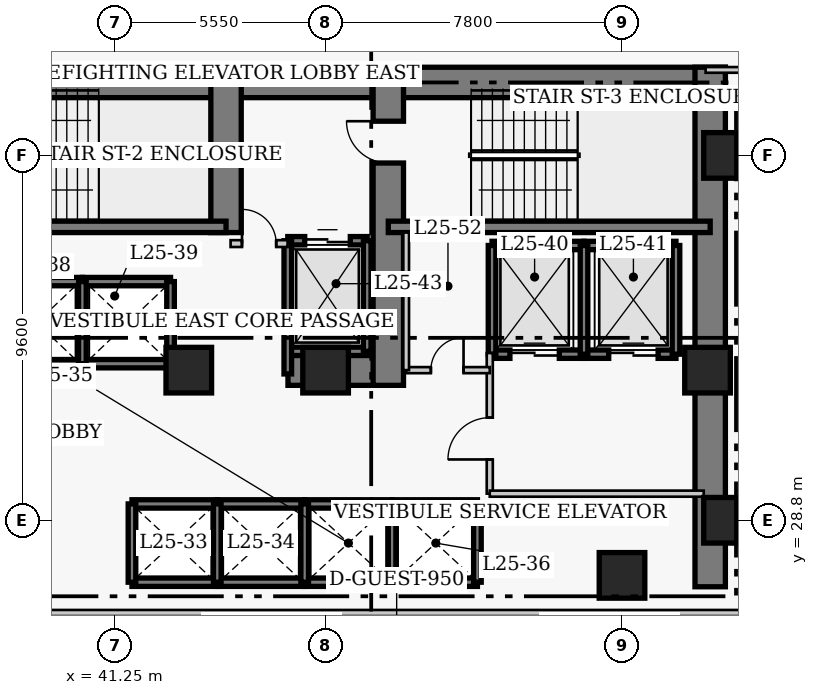
"""IFC4 building model, lengths in metres.
Left out: names, types, materials, properties, quantities, classifications, styles, units other than length and angle.
Written with IfcOpenShell. Run it as: python <this file> out.ifc"""

import sys

from ifc_helpers import new_model, si_unit, direction, frame, frame_2d, origin, origin_2d, place, context, subcontext, project, spatial, rectangle, extrude, element, fill, save


model = new_model("IFC4")
c1 = context("Model", 3, precision=1e-05, world=origin(), true_north=direction((0.0, 1.0)))
c2 = subcontext(c1, "Body", "Model", "MODEL_VIEW")
j1 = project(units=[si_unit("LENGTHUNIT", "METRE"), si_unit("PLANEANGLEUNIT", "RADIAN")], contexts=[c1])
p1 = place(None, origin())
s1 = spatial("IfcSite", under=j1, at=p1, CompositionType="ELEMENT")
p2 = place(p1, origin())
s2 = spatial("IfcBuilding", under=s1, at=p2, CompositionType="ELEMENT")
p3 = place(p2, frame((0.0, 0.0, 103.2)))
s3 = spatial("IfcBuildingStorey", under=s2, at=p3, CompositionType="ELEMENT", Elevation=103.2)
p4 = place(p3, frame((35.85, 40.32, 0.0), z_axis=(0.0, 0.0, 1.0), x_axis=(1.0, 0.0, 0.0)))
e1 = element("IfcWall", 1, at=p4, inside=s3, PredefinedType="SHEAR", context=c2, shape_type="SweptSolid", body=[
    extrude(rectangle(XDim=12.6, YDim=0.8, at=frame_2d((6.3, 0.0))), origin(), (0.0, 0.0, 1.0), 3.8),
])
p5 = place(p3, frame((48.45, 40.32, 0.0), z_axis=(0.0, 0.0, 1.0), x_axis=(1.0, 0.0, 0.0)))
e2 = element("IfcWall", 2, at=p5, inside=s3, PredefinedType="SHEAR", context=c2, shape_type="SweptSolid", body=[
    extrude(rectangle(XDim=8.87, YDim=0.8, at=frame_2d((4.435, 0.0))), origin(), (0.0, 0.0, 1.0), 3.8),
])
p6 = place(p3, frame((56.92, 27.05, 0.0), z_axis=(0.0, 0.0, 1.0), x_axis=(0.0, 1.0, 0.0)))
e3 = element("IfcWall", 3, at=p6, inside=s3, PredefinedType="SHEAR", context=c2, shape_type="SweptSolid", body=[
    extrude(rectangle(XDim=13.67, YDim=0.8, at=frame_2d((6.835, 0.0))), origin(), (0.0, 0.0, 1.0), 3.8),
])
p7 = place(p3, frame((45.81, 32.75, 0.0), z_axis=(0.0, 0.0, 1.0), x_axis=(1.0, 0.0, 0.0)))
e4 = element("IfcWall", 4, at=p7, inside=s3, PredefinedType="SHEAR", context=c2, shape_type="SweptSolid", body=[
    extrude(rectangle(XDim=2.64, YDim=0.8, at=frame_2d((1.32, 0.0))), origin(), (0.0, 0.0, 1.0), 3.8),
])
p8 = place(p3, frame((44.18, 36.37, 0.0), z_axis=(0.0, 0.0, 1.0), x_axis=(0.0, 1.0, 0.0)))
e5 = element("IfcWall", 5, at=p8, inside=s3, PredefinedType="SHEAR", context=c2, shape_type="SweptSolid", body=[
    extrude(rectangle(XDim=3.95, YDim=0.8, at=frame_2d((1.975, 0.0))), origin(), (0.0, 0.0, 1.0), 3.8),
])
p9 = place(p3, frame((48.45, 32.35, 0.0), z_axis=(0.0, 0.0, 1.0), x_axis=(0.0, 1.0, 0.0)))
e6 = element("IfcWall", 6, at=p9, inside=s3, PredefinedType="SHEAR", context=c2, shape_type="SweptSolid", body=[
    extrude(rectangle(XDim=7.97, YDim=0.8, at=frame_2d((3.985, 0.0))), origin(), (0.0, 0.0, 1.0), 3.8),
])
p10 = place(p9, frame((5.85, 0.0, 0.0)))
e7 = element("IfcOpeningElement", 7, at=p10, cuts=e6, PredefinedType="OPENING", context=c2, shape_type="SweptSolid", body=[
    extrude(rectangle(XDim=1.1, YDim=2.15, at=frame_2d((0.55, 1.075))), frame((0.0, 0.41, 0.0), z_axis=(0.0, -1.0, 0.0), x_axis=(1.0, 0.0, 0.0)), (0.0, 0.0, 1.0), 0.82),
])
p11 = place(p3, frame((35.85, 36.52, 0.0), z_axis=(0.0, 0.0, 1.0), x_axis=(1.0, 0.0, 0.0)))
e8 = element("IfcWall", 8, at=p11, inside=s3, PredefinedType="SHEAR", context=c2, shape_type="SweptSolid", body=[
    extrude(rectangle(XDim=8.33, YDim=0.3, at=frame_2d((4.165, 0.0))), origin(), (0.0, 0.0, 1.0), 3.8),
])
p12 = place(p3, frame((48.45, 36.52, 0.0), z_axis=(0.0, 0.0, 1.0), x_axis=(1.0, 0.0, 0.0)))
e9 = element("IfcWall", 9, at=p12, inside=s3, PredefinedType="SHEAR", context=c2, shape_type="SweptSolid", body=[
    extrude(rectangle(XDim=8.47, YDim=0.3, at=frame_2d((4.235, 0.0))), origin(), (0.0, 0.0, 1.0), 3.8),
])
for number, where, z_axis, x_axis in (
    (10, (57.35, 28.8, 0.0), (0.0, 0.0, 1.0), (1.0, 0.0, 0.0)),
    (11, (57.35, 38.4, 0.0), (0.0, 0.0, 1.0), (1.0, 0.0, 0.0)),
    (12, (43.2, 32.75, 0.0), (0.0, 0.0, 1.0), (1.0, 0.0, 0.0)),
    (13, (46.8, 32.75, 0.0), (0.0, 0.0, 1.0), (1.0, 0.0, 0.0)),
    (14, (54.6, 27.35, 0.0), (0.0, 0.0, 1.0), (1.0, 0.0, 0.0)),
    (15, (56.85, 32.75, 0.0), (0.0, 0.0, 1.0), (1.0, 0.0, 0.0)),
):
    element("IfcColumn", number, at=place(p3, frame(where, z_axis=z_axis, x_axis=x_axis)), inside=s3, PredefinedType="COLUMN", context=c2, shape_type="SweptSolid", body=[
        extrude(rectangle(XDim=1.2, YDim=1.2, at=origin_2d()), origin(), (0.0, 0.0, 1.0), 3.8),
    ])
for number, where, z_axis, x_axis in (
    (16, (41.705, 29.23, 0.0), (0.0, 0.0, 1.0), (1.0, 0.0, 0.0)),
    (17, (41.705, 27.17, 0.0), (0.0, 0.0, 1.0), (1.0, 0.0, 0.0)),
):
    element("IfcWall", number, at=place(p3, frame(where, z_axis=z_axis, x_axis=x_axis)), inside=s3, PredefinedType="SHEAR", context=c2, shape_type="SweptSolid", body=[
        extrude(rectangle(XDim=2.245, YDim=0.22, at=frame_2d((1.123, 0.0))), origin(), (0.0, 0.0, 1.0), 3.8),
    ])
p13 = place(p3, frame((41.705, 27.17, 0.0), z_axis=(0.0, 0.0, 1.0), x_axis=(0.0, 1.0, 0.0)))
e18 = element("IfcWall", 18, at=p13, inside=s3, PredefinedType="SHEAR", context=c2, shape_type="SweptSolid", body=[
    extrude(rectangle(XDim=2.06, YDim=0.2, at=frame_2d((1.03, 0.0))), origin(), (0.0, 0.0, 1.0), 3.8),
])
for number, where, z_axis, x_axis in (
    (19, (43.95, 29.23, 0.0), (0.0, 0.0, 1.0), (1.0, 0.0, 0.0)),
    (20, (43.95, 27.17, 0.0), (0.0, 0.0, 1.0), (1.0, 0.0, 0.0)),
):
    element("IfcWall", number, at=place(p3, frame(where, z_axis=z_axis, x_axis=x_axis)), inside=s3, PredefinedType="SHEAR", context=c2, shape_type="SweptSolid", body=[
        extrude(rectangle(XDim=2.3, YDim=0.22, at=frame_2d((1.15, 0.0))), origin(), (0.0, 0.0, 1.0), 3.8),
    ])
p14 = place(p3, frame((43.95, 27.17, 0.0), z_axis=(0.0, 0.0, 1.0), x_axis=(0.0, 1.0, 0.0)))
e21 = element("IfcWall", 21, at=p14, inside=s3, PredefinedType="SHEAR", context=c2, shape_type="SweptSolid", body=[
    extrude(rectangle(XDim=2.06, YDim=0.2, at=frame_2d((1.03, 0.0))), origin(), (0.0, 0.0, 1.0), 3.8),
])
for number, where, z_axis, x_axis in (
    (22, (46.25, 29.23, 0.0), (0.0, 0.0, 1.0), (1.0, 0.0, 0.0)),
    (23, (46.25, 27.17, 0.0), (0.0, 0.0, 1.0), (1.0, 0.0, 0.0)),
):
    element("IfcWall", number, at=place(p3, frame(where, z_axis=z_axis, x_axis=x_axis)), inside=s3, PredefinedType="SHEAR", context=c2, shape_type="SweptSolid", body=[
        extrude(rectangle(XDim=2.3, YDim=0.22, at=frame_2d((1.15, 0.0))), origin(), (0.0, 0.0, 1.0), 3.8),
    ])
p15 = place(p3, frame((46.25, 27.17, 0.0), z_axis=(0.0, 0.0, 1.0), x_axis=(0.0, 1.0, 0.0)))
e24 = element("IfcWall", 24, at=p15, inside=s3, PredefinedType="SHEAR", context=c2, shape_type="SweptSolid", body=[
    extrude(rectangle(XDim=2.06, YDim=0.2, at=frame_2d((1.03, 0.0))), origin(), (0.0, 0.0, 1.0), 3.8),
])
for number, where, z_axis, x_axis in (
    (25, (48.55, 29.23, 0.0), (0.0, 0.0, 1.0), (1.0, 0.0, 0.0)),
    (26, (48.55, 27.17, 0.0), (0.0, 0.0, 1.0), (1.0, 0.0, 0.0)),
):
    element("IfcWall", number, at=place(p3, frame(where, z_axis=z_axis, x_axis=x_axis)), inside=s3, PredefinedType="SHEAR", context=c2, shape_type="SweptSolid", body=[
        extrude(rectangle(XDim=2.245, YDim=0.22, at=frame_2d((1.123, 0.0))), origin(), (0.0, 0.0, 1.0), 3.8),
    ])
for number, where, z_axis, x_axis in (
    (27, (48.55, 27.17, 0.0), (0.0, 0.0, 1.0), (0.0, 1.0, 0.0)),
    (28, (50.795, 27.17, 0.0), (0.0, 0.0, 1.0), (0.0, 1.0, 0.0)),
):
    element("IfcWall", number, at=place(p3, frame(where, z_axis=z_axis, x_axis=x_axis)), inside=s3, PredefinedType="SHEAR", context=c2, shape_type="SweptSolid", body=[
        extrude(rectangle(XDim=2.06, YDim=0.2, at=frame_2d((1.03, 0.0))), origin(), (0.0, 0.0, 1.0), 3.8),
    ])
for number, where, z_axis, x_axis in (
    (29, (38.0, 35.08, 0.0), (0.0, 0.0, 1.0), (1.0, 0.0, 0.0)),
    (30, (38.0, 32.92, 0.0), (0.0, 0.0, 1.0), (1.0, 0.0, 0.0)),
):
    element("IfcWall", number, at=place(p3, frame(where, z_axis=z_axis, x_axis=x_axis)), inside=s3, PredefinedType="SHEAR", context=c2, shape_type="SweptSolid", body=[
        extrude(rectangle(XDim=2.4, YDim=0.22, at=frame_2d((1.2, 0.0))), origin(), (0.0, 0.0, 1.0), 3.8),
    ])
for number, where, z_axis, x_axis in (
    (31, (40.4, 35.08, 0.0), (0.0, 0.0, 1.0), (1.0, 0.0, 0.0)),
    (32, (40.4, 32.92, 0.0), (0.0, 0.0, 1.0), (1.0, 0.0, 0.0)),
):
    element("IfcWall", number, at=place(p3, frame(where, z_axis=z_axis, x_axis=x_axis)), inside=s3, PredefinedType="SHEAR", context=c2, shape_type="SweptSolid", body=[
        extrude(rectangle(XDim=2.32, YDim=0.22, at=frame_2d((1.16, 0.0))), origin(), (0.0, 0.0, 1.0), 3.8),
    ])
for number, where, z_axis, x_axis in (
    (33, (40.4, 32.92, 0.0), (0.0, 0.0, 1.0), (0.0, 1.0, 0.0)),
    (34, (42.72, 32.92, 0.0), (0.0, 0.0, 1.0), (0.0, 1.0, 0.0)),
):
    element("IfcWall", number, at=place(p3, frame(where, z_axis=z_axis, x_axis=x_axis)), inside=s3, PredefinedType="SHEAR", context=c2, shape_type="SweptSolid", body=[
        extrude(rectangle(XDim=2.16, YDim=0.2, at=frame_2d((1.08, 0.0))), origin(), (0.0, 0.0, 1.0), 3.8),
    ])
p16 = place(p3, frame((51.18, 36.03, 0.0), z_axis=(0.0, 0.0, 1.0), x_axis=(1.0, 0.0, 0.0)))
e35 = element("IfcWall", 35, at=p16, inside=s3, PredefinedType="SHEAR", context=c2, shape_type="SweptSolid", body=[
    extrude(rectangle(XDim=2.42, YDim=0.22, at=frame_2d((1.21, 0.0))), origin(), (0.0, 0.0, 1.0), 3.8),
])
p17 = place(p3, frame((51.18, 33.17, 0.0), z_axis=(0.0, 0.0, 1.0), x_axis=(1.0, 0.0, 0.0)))
e36 = element("IfcWall", 36, at=p17, inside=s3, PredefinedType="SHEAR", context=c2, shape_type="SweptSolid", body=[
    extrude(rectangle(XDim=2.42, YDim=0.22, at=frame_2d((1.21, 0.0))), origin(), (0.0, 0.0, 1.0), 3.8),
])
p18 = place(p17, frame((0.47, 0.0, 0.0)))
e37 = element("IfcOpeningElement", 37, at=p18, cuts=e36, PredefinedType="OPENING", context=c2, shape_type="SweptSolid", body=[
    extrude(rectangle(XDim=1.3, YDim=2.15, at=frame_2d((0.65, 1.075))), frame((0.0, 0.12, 0.0), z_axis=(0.0, -1.0, 0.0), x_axis=(1.0, 0.0, 0.0)), (0.0, 0.0, 1.0), 0.24),
])
p19 = place(p3, frame((51.18, 33.17, 0.0), z_axis=(0.0, 0.0, 1.0), x_axis=(0.0, 1.0, 0.0)))
e38 = element("IfcWall", 38, at=p19, inside=s3, PredefinedType="SHEAR", context=c2, shape_type="SweptSolid", body=[
    extrude(rectangle(XDim=2.86, YDim=0.2, at=frame_2d((1.43, 0.0))), origin(), (0.0, 0.0, 1.0), 3.8),
])
p20 = place(p3, frame((53.6, 36.03, 0.0), z_axis=(0.0, 0.0, 1.0), x_axis=(1.0, 0.0, 0.0)))
e39 = element("IfcWall", 39, at=p20, inside=s3, PredefinedType="SHEAR", context=c2, shape_type="SweptSolid", body=[
    extrude(rectangle(XDim=2.42, YDim=0.22, at=frame_2d((1.21, 0.0))), origin(), (0.0, 0.0, 1.0), 3.8),
])
p21 = place(p3, frame((53.6, 33.17, 0.0), z_axis=(0.0, 0.0, 1.0), x_axis=(1.0, 0.0, 0.0)))
e40 = element("IfcWall", 40, at=p21, inside=s3, PredefinedType="SHEAR", context=c2, shape_type="SweptSolid", body=[
    extrude(rectangle(XDim=2.42, YDim=0.22, at=frame_2d((1.21, 0.0))), origin(), (0.0, 0.0, 1.0), 3.8),
])
p22 = place(p21, frame((0.65, 0.0, 0.0)))
e41 = element("IfcOpeningElement", 41, at=p22, cuts=e40, PredefinedType="OPENING", context=c2, shape_type="SweptSolid", body=[
    extrude(rectangle(XDim=1.3, YDim=2.15, at=frame_2d((0.65, 1.075))), frame((0.0, 0.12, 0.0), z_axis=(0.0, -1.0, 0.0), x_axis=(1.0, 0.0, 0.0)), (0.0, 0.0, 1.0), 0.24),
])
for number, where, z_axis, x_axis in (
    (42, (53.6, 33.17, 0.0), (0.0, 0.0, 1.0), (0.0, 1.0, 0.0)),
    (43, (56.02, 33.17, 0.0), (0.0, 0.0, 1.0), (0.0, 1.0, 0.0)),
):
    element("IfcWall", number, at=place(p3, frame(where, z_axis=z_axis, x_axis=x_axis)), inside=s3, PredefinedType="SHEAR", context=c2, shape_type="SweptSolid", body=[
        extrude(rectangle(XDim=2.86, YDim=0.2, at=frame_2d((1.43, 0.0))), origin(), (0.0, 0.0, 1.0), 3.8),
    ])
p23 = place(p3, frame((45.805, 36.155, 0.0), z_axis=(0.0, 0.0, 1.0), x_axis=(1.0, 0.0, 0.0)))
e44 = element("IfcWall", 44, at=p23, inside=s3, PredefinedType="SHEAR", context=c2, shape_type="SweptSolid", body=[
    extrude(rectangle(XDim=2.09, YDim=0.22, at=frame_2d((1.045, 0.0))), origin(), (0.0, 0.0, 1.0), 3.8),
])
p24 = place(p23, frame((0.445, 0.0, 0.0)))
e45 = element("IfcOpeningElement", 45, at=p24, cuts=e44, PredefinedType="OPENING", context=c2, shape_type="SweptSolid", body=[
    extrude(rectangle(XDim=1.2, YDim=2.15, at=frame_2d((0.6, 1.075))), frame((0.0, 0.12, 0.0), z_axis=(0.0, -1.0, 0.0), x_axis=(1.0, 0.0, 0.0)), (0.0, 0.0, 1.0), 0.24),
])
p25 = place(p3, frame((45.805, 33.245, 0.0), z_axis=(0.0, 0.0, 1.0), x_axis=(1.0, 0.0, 0.0)))
e46 = element("IfcWall", 46, at=p25, inside=s3, PredefinedType="SHEAR", context=c2, shape_type="SweptSolid", body=[
    extrude(rectangle(XDim=2.09, YDim=0.22, at=frame_2d((1.045, 0.0))), origin(), (0.0, 0.0, 1.0), 3.8),
])
p26 = place(p3, frame((45.805, 32.65, 0.0), z_axis=(0.0, 0.0, 1.0), x_axis=(0.0, 1.0, 0.0)))
e47 = element("IfcWall", 47, at=p26, inside=s3, PredefinedType="SHEAR", context=c2, shape_type="SweptSolid", body=[
    extrude(rectangle(XDim=3.505, YDim=0.2, at=frame_2d((1.752, 0.0))), origin(), (0.0, 0.0, 1.0), 3.8),
])
p27 = place(p3, frame((47.895, 33.245, 0.0), z_axis=(0.0, 0.0, 1.0), x_axis=(0.0, 1.0, 0.0)))
e48 = element("IfcWall", 48, at=p27, inside=s3, PredefinedType="SHEAR", context=c2, shape_type="SweptSolid", body=[
    extrude(rectangle(XDim=2.91, YDim=0.2, at=frame_2d((1.455, 0.0))), origin(), (0.0, 0.0, 1.0), 3.8),
])
p28 = place(p3, frame((44.3, 36.08, 0.0), z_axis=(0.0, 0.0, 1.0), x_axis=(1.0, 0.0, 0.0)))
e49 = element("IfcWall", 49, at=p28, inside=s3, PredefinedType="PARTITIONING", context=c2, shape_type="SweptSolid", body=[
    extrude(rectangle(XDim=1.5, YDim=0.18, at=frame_2d((0.75, 0.0))), origin(), (0.0, 0.0, 1.0), 3.54),
])
p29 = place(p28, frame((0.3, 0.0, 0.0)))
e50 = element("IfcOpeningElement", 50, at=p29, cuts=e49, PredefinedType="OPENING", context=c2, shape_type="SweptSolid", body=[
    extrude(rectangle(XDim=0.9, YDim=2.15, at=frame_2d((0.45, 1.075))), frame((0.0, 0.1, 0.0), z_axis=(0.0, -1.0, 0.0), x_axis=(1.0, 0.0, 0.0)), (0.0, 0.0, 1.0), 0.2),
])
p30 = place(p3, frame((51.12, 29.5, 0.0), z_axis=(0.0, 0.0, 1.0), x_axis=(0.0, 1.0, 0.0)))
e51 = element("IfcWall", 51, at=p30, inside=s3, PredefinedType="PARTITIONING", context=c2, shape_type="SweptSolid", body=[
    extrude(rectangle(XDim=3.7, YDim=0.16, at=frame_2d((1.85, 0.0))), origin(), (0.0, 0.0, 1.0), 3.54),
])
p31 = place(p30, frame((0.9, 0.0, 0.0)))
e52 = element("IfcOpeningElement", 52, at=p31, cuts=e51, PredefinedType="OPENING", context=c2, shape_type="SweptSolid", body=[
    extrude(rectangle(XDim=1.1, YDim=2.15, at=frame_2d((0.55, 1.075))), frame((0.0, 0.09, 0.0), z_axis=(0.0, -1.0, 0.0), x_axis=(1.0, 0.0, 0.0)), (0.0, 0.0, 1.0), 0.18),
])
p32 = place(p3, frame((51.12, 29.5, 0.0), z_axis=(0.0, 0.0, 1.0), x_axis=(1.0, 0.0, 0.0)))
e53 = element("IfcWall", 53, at=p32, inside=s3, PredefinedType="PARTITIONING", context=c2, shape_type="SweptSolid", body=[
    extrude(rectangle(XDim=5.63, YDim=0.16, at=frame_2d((2.815, 0.0))), origin(), (0.0, 0.0, 1.0), 3.54),
])
p33 = place(p3, frame((48.92, 32.75, 0.0), z_axis=(0.0, 0.0, 1.0), x_axis=(1.0, 0.0, 0.0)))
e54 = element("IfcWall", 54, at=p33, inside=s3, PredefinedType="PARTITIONING", context=c2, shape_type="SweptSolid", body=[
    extrude(rectangle(XDim=2.2, YDim=0.16, at=frame_2d((1.1, 0.0))), origin(), (0.0, 0.0, 1.0), 3.54),
])
p34 = place(p33, frame((0.65, 0.0, 0.0)))
e55 = element("IfcOpeningElement", 55, at=p34, cuts=e54, PredefinedType="OPENING", context=c2, shape_type="SweptSolid", body=[
    extrude(rectangle(XDim=0.86, YDim=2.05, at=frame_2d((0.43, 1.025))), frame((0.0, 0.09, 0.0), z_axis=(0.0, -1.0, 0.0), x_axis=(1.0, 0.0, 0.0)), (0.0, 0.0, 1.0), 0.18),
])
p35 = place(p3, frame((48.92, 32.75, 0.0), z_axis=(0.0, 0.0, 1.0), x_axis=(0.0, 1.0, 0.0)))
e56 = element("IfcWall", 56, at=p35, inside=s3, PredefinedType="PARTITIONING", context=c2, shape_type="SweptSolid", body=[
    extrude(rectangle(XDim=3.62, YDim=0.15, at=frame_2d((1.81, 0.0))), origin(), (0.0, 0.0, 1.0), 3.54),
])
p36 = place(p3, frame((35.85, 26.36, 0.0), z_axis=(0.0, 0.0, 1.0), x_axis=(1.0, 0.0, 0.0)))
e57 = element("IfcWall", 57, at=p36, inside=s3, PredefinedType="PARTITIONING", context=c2, shape_type="SweptSolid", body=[
    extrude(rectangle(XDim=22.45, YDim=0.16, at=frame_2d((11.225, 0.0))), origin(), (0.0, 0.0, 1.0), 3.54),
])
p37 = place(p3, frame((56.8, 40.65, 0.0), z_axis=(0.0, 0.0, 1.0), x_axis=(1.0, 0.0, 0.0)))
e58 = element("IfcWall", 58, at=p37, inside=s3, PredefinedType="PARTITIONING", context=c2, shape_type="SweptSolid", body=[
    extrude(rectangle(XDim=3.66, YDim=0.15, at=frame_2d((1.83, 0.0))), origin(), (0.0, 0.0, 1.0), 3.54),
])
p38 = place(p37, frame((2.05, 0.0, 0.0)))
e59 = element("IfcOpeningElement", 59, at=p38, cuts=e58, PredefinedType="OPENING", context=c2, shape_type="SweptSolid", body=[
    extrude(rectangle(XDim=1.0, YDim=2.15, at=frame_2d((0.5, 1.075))), frame((0.0, 0.085, 0.0), z_axis=(0.0, -1.0, 0.0), x_axis=(1.0, 0.0, 0.0)), (0.0, 0.0, 1.0), 0.17),
])
p39 = place(p18, origin())
e60 = element("IfcDoor", 60, at=p39, inside=s3, OperationType="DOUBLE_DOOR_SLIDING", PredefinedType="DOOR", context=c2, shape_type="SweptSolid", body=[
    extrude(rectangle(XDim=1.3, YDim=2.15, at=frame_2d((0.65, 1.075))), frame((0.0, 0.025, 0.0), z_axis=(0.0, -1.0, 0.0), x_axis=(1.0, 0.0, 0.0)), (0.0, 0.0, 1.0), 0.05),
])
fill(e37, e60)
p40 = place(p22, origin())
e61 = element("IfcDoor", 61, at=p40, inside=s3, OperationType="DOUBLE_DOOR_SLIDING", PredefinedType="DOOR", context=c2, shape_type="SweptSolid", body=[
    extrude(rectangle(XDim=1.3, YDim=2.15, at=frame_2d((0.65, 1.075))), frame((0.0, 0.025, 0.0), z_axis=(0.0, -1.0, 0.0), x_axis=(1.0, 0.0, 0.0)), (0.0, 0.0, 1.0), 0.05),
])
fill(e41, e61)
p41 = place(p24, origin())
e62 = element("IfcDoor", 62, at=p41, inside=s3, OperationType="DOUBLE_DOOR_SLIDING", PredefinedType="DOOR", context=c2, shape_type="SweptSolid", body=[
    extrude(rectangle(XDim=1.2, YDim=2.15, at=frame_2d((0.6, 1.075))), frame((0.0, 0.025, 0.0), z_axis=(0.0, -1.0, 0.0), x_axis=(1.0, 0.0, 0.0)), (0.0, 0.0, 1.0), 0.05),
])
fill(e45, e62)
p42 = place(p29, origin())
e63 = element("IfcDoor", 63, at=p42, inside=s3, OperationType="SINGLE_SWING_LEFT", PredefinedType="DOOR", context=c2, shape_type="SweptSolid", body=[
    extrude(rectangle(XDim=0.9, YDim=2.15, at=frame_2d((0.45, 1.075))), frame((0.0, 0.025, 0.0), z_axis=(0.0, -1.0, 0.0), x_axis=(1.0, 0.0, 0.0)), (0.0, 0.0, 1.0), 0.05),
])
fill(e50, e63)
p43 = place(p31, origin())
e64 = element("IfcDoor", 64, at=p43, inside=s3, OperationType="SINGLE_SWING_LEFT", PredefinedType="DOOR", context=c2, shape_type="SweptSolid", body=[
    extrude(rectangle(XDim=1.1, YDim=2.15, at=frame_2d((0.55, 1.075))), frame((0.0, 0.025, 0.0), z_axis=(0.0, -1.0, 0.0), x_axis=(1.0, 0.0, 0.0)), (0.0, 0.0, 1.0), 0.05),
])
fill(e52, e64)
p44 = place(p34, origin())
e65 = element("IfcDoor", 65, at=p44, inside=s3, OperationType="SINGLE_SWING_RIGHT", PredefinedType="DOOR", context=c2, shape_type="SweptSolid", body=[
    extrude(rectangle(XDim=0.86, YDim=2.05, at=frame_2d((0.43, 1.025))), frame((0.0, 0.025, 0.0), z_axis=(0.0, -1.0, 0.0), x_axis=(1.0, 0.0, 0.0)), (0.0, 0.0, 1.0), 0.05),
])
fill(e55, e65)
p45 = place(p10, origin())
e66 = element("IfcDoor", 66, at=p45, inside=s3, OperationType="SINGLE_SWING_RIGHT", PredefinedType="DOOR", context=c2, shape_type="SweptSolid", body=[
    extrude(rectangle(XDim=1.1, YDim=2.15, at=frame_2d((0.55, 1.075))), frame((0.0, 0.025, 0.0), z_axis=(0.0, -1.0, 0.0), x_axis=(1.0, 0.0, 0.0)), (0.0, 0.0, 1.0), 0.05),
])
fill(e7, e66)
save(model, sys.argv[1])
